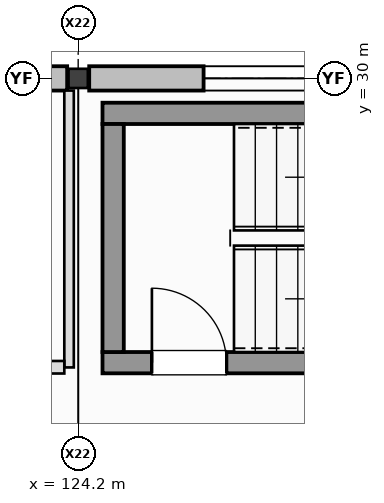
"""IFC4 building model, lengths in metres.
Left out: names, types, materials, properties, quantities, classifications, styles, units other than length and angle.
Written with IfcOpenShell. Run it as: python <this file> out.ifc"""

import sys

from ifc_helpers import new_model, si_unit, direction, frame, frame_2d, origin, origin_2d, place, context, subcontext, project, spatial, rectangle, i_section, extrude, element, fill, save


model = new_model("IFC4")
c1 = context("Model", 3, precision=1e-05, world=origin(), true_north=direction((0.0, 1.0)))
c2 = subcontext(c1, "Body", "Model", "MODEL_VIEW")
j1 = project(units=[si_unit("LENGTHUNIT", "METRE"), si_unit("PLANEANGLEUNIT", "RADIAN")], contexts=[c1])
p1 = place(None, origin())
s1 = spatial("IfcSite", under=j1, at=p1, CompositionType="ELEMENT")
p2 = place(p1, origin())
s2 = spatial("IfcBuilding", under=s1, at=p2, CompositionType="ELEMENT")
p3 = place(p2, origin())
s3 = spatial("IfcBuildingStorey", under=s2, at=p3, CompositionType="ELEMENT", Elevation=0.0)
p4 = place(p3, frame((124.2, 30.0, -0.41), z_axis=(0.0, 0.0, 1.0), x_axis=(1.0, 0.0, 0.0)))
e1 = element("IfcColumn", 1, at=p4, inside=s3, PredefinedType="COLUMN", context=c2, shape_type="SweptSolid", body=[
    extrude(i_section(OverallWidth=0.254, OverallDepth=0.253, WebThickness=0.009, FlangeThickness=0.014, at=origin_2d()), origin(), (0.0, 0.0, 1.0), 6.41),
])
p5 = place(p3, frame((124.055, 30.0, 0.0), z_axis=(0.0, 0.0, 1.0), x_axis=(-1.0, 0.0, 0.0)))
e2 = element("IfcWall", 2, at=p5, inside=s3, PredefinedType="STANDARD", context=c2, shape_type="SweptSolid", body=[
    extrude(rectangle(XDim=5.71, YDim=0.32, at=frame_2d((2.855, 0.0))), origin(), (0.0, 0.0, 1.0), 5.035),
])
p6 = place(p5, frame((1.68, 0.0, 0.85)))
e3 = element("IfcOpeningElement", 3, at=p6, cuts=e2, PredefinedType="OPENING", context=c2, shape_type="SweptSolid", body=[
    extrude(rectangle(XDim=2.35, YDim=1.75, at=frame_2d((1.175, 0.875))), frame((0.0, 0.17, 0.0), z_axis=(0.0, -1.0, 0.0), x_axis=(1.0, 0.0, 0.0)), (0.0, 0.0, 1.0), 0.34),
])
p7 = place(p3, frame((130.055, 30.0, 0.0), z_axis=(0.0, 0.0, 1.0), x_axis=(-1.0, 0.0, 0.0)))
e4 = element("IfcWall", 4, at=p7, inside=s3, PredefinedType="STANDARD", context=c2, shape_type="SweptSolid", body=[
    extrude(rectangle(XDim=5.71, YDim=0.32, at=frame_2d((2.855, 0.0))), origin(), (0.0, 0.0, 1.0), 5.035),
])
p8 = place(p7, frame((1.505, 0.0, 0.85)))
e5 = element("IfcOpeningElement", 5, at=p8, cuts=e4, PredefinedType="OPENING", context=c2, shape_type="SweptSolid", body=[
    extrude(rectangle(XDim=2.7, YDim=1.75, at=frame_2d((1.35, 0.875))), frame((0.0, 0.17, 0.0), z_axis=(0.0, -1.0, 0.0), x_axis=(1.0, 0.0, 0.0)), (0.0, 0.0, 1.0), 0.34),
])
p9 = place(p3, frame((124.52, 26.26, 0.0), z_axis=(0.0, 0.0, 1.0), x_axis=(1.0, 0.0, 0.0)))
e6 = element("IfcWall", 6, at=p9, inside=s3, PredefinedType="SHEAR", context=c2, shape_type="SweptSolid", body=[
    extrude(rectangle(XDim=8.16, YDim=0.28, at=frame_2d((4.08, 0.0))), origin(), (0.0, 0.0, 1.0), 6.0),
])
p10 = place(p9, frame((0.65, 0.0, 0.0)))
e7 = element("IfcOpeningElement", 7, at=p10, cuts=e6, PredefinedType="OPENING", context=c2, shape_type="SweptSolid", body=[
    extrude(rectangle(XDim=0.98, YDim=2.15, at=frame_2d((0.49, 1.075))), frame((0.0, 0.15, 0.0), z_axis=(0.0, -1.0, 0.0), x_axis=(1.0, 0.0, 0.0)), (0.0, 0.0, 1.0), 0.3),
])
p11 = place(p3, frame((132.68, 29.54, 0.0), z_axis=(0.0, 0.0, 1.0), x_axis=(-1.0, 0.0, 0.0)))
e8 = element("IfcWall", 8, at=p11, inside=s3, PredefinedType="SHEAR", context=c2, shape_type="SweptSolid", body=[
    extrude(rectangle(XDim=8.16, YDim=0.28, at=frame_2d((4.08, 0.0))), origin(), (0.0, 0.0, 1.0), 6.0),
])
p12 = place(p3, frame((124.66, 29.4, 0.0), z_axis=(0.0, 0.0, 1.0), x_axis=(0.0, -1.0, 0.0)))
e9 = element("IfcWall", 9, at=p12, inside=s3, PredefinedType="SHEAR", context=c2, shape_type="SweptSolid", body=[
    extrude(rectangle(XDim=3.0, YDim=0.28, at=frame_2d((1.5, 0.0))), origin(), (0.0, 0.0, 1.0), 6.0),
])
p13 = place(p3, frame((124.08, 29.84, 0.0), z_axis=(0.0, 0.0, 1.0), x_axis=(0.0, -1.0, 0.0)))
e10 = element("IfcWall", 10, at=p13, inside=s3, PredefinedType="PARTITIONING", context=c2, shape_type="SweptSolid", body=[
    extrude(rectangle(XDim=3.643, YDim=0.125, at=frame_2d((1.821, 0.0))), origin(), (0.0, 0.0, 1.0), 5.044),
])
p14 = place(p3, frame((124.018, 26.2, 0.0), z_axis=(0.0, 0.0, 1.0), x_axis=(-1.0, 0.0, 0.0)))
e11 = element("IfcWall", 11, at=p14, inside=s3, PredefinedType="PARTITIONING", context=c2, shape_type="SweptSolid", body=[
    extrude(rectangle(XDim=11.657, YDim=0.165, at=frame_2d((5.829, 0.0))), origin(), (0.0, 0.0, 1.0), 5.68),
])
p15 = place(p14, frame((4.837, 0.0, 0.0)))
e12 = element("IfcOpeningElement", 12, at=p15, cuts=e11, PredefinedType="OPENING", context=c2, shape_type="SweptSolid", body=[
    extrude(rectangle(XDim=1.76, YDim=2.26, at=frame_2d((0.88, 1.13))), frame((0.0, 0.093, 0.0), z_axis=(0.0, -1.0, 0.0), x_axis=(1.0, 0.0, 0.0)), (0.0, 0.0, 1.0), 0.185),
])
p16 = place(p8, origin())
e13 = element("IfcWindow", 13, at=p16, inside=s3, PartitioningType="SINGLE_PANEL", PredefinedType="WINDOW", context=c2, shape_type="SweptSolid", body=[
    extrude(rectangle(XDim=2.7, YDim=1.75, at=frame_2d((1.35, 0.875))), frame((0.0, 0.03, 0.0), z_axis=(0.0, -1.0, 0.0), x_axis=(1.0, 0.0, 0.0)), (0.0, 0.0, 1.0), 0.06),
])
fill(e5, e13)
p17 = place(p10, origin())
e14 = element("IfcDoor", 14, at=p17, inside=s3, OperationType="SINGLE_SWING_LEFT", PredefinedType="DOOR", context=c2, shape_type="SweptSolid", body=[
    extrude(rectangle(XDim=0.98, YDim=2.15, at=frame_2d((0.49, 1.075))), frame((0.0, 0.025, 0.0), z_axis=(0.0, -1.0, 0.0), x_axis=(1.0, 0.0, 0.0)), (0.0, 0.0, 1.0), 0.05),
])
fill(e7, e14)
save(model, sys.argv[1])
